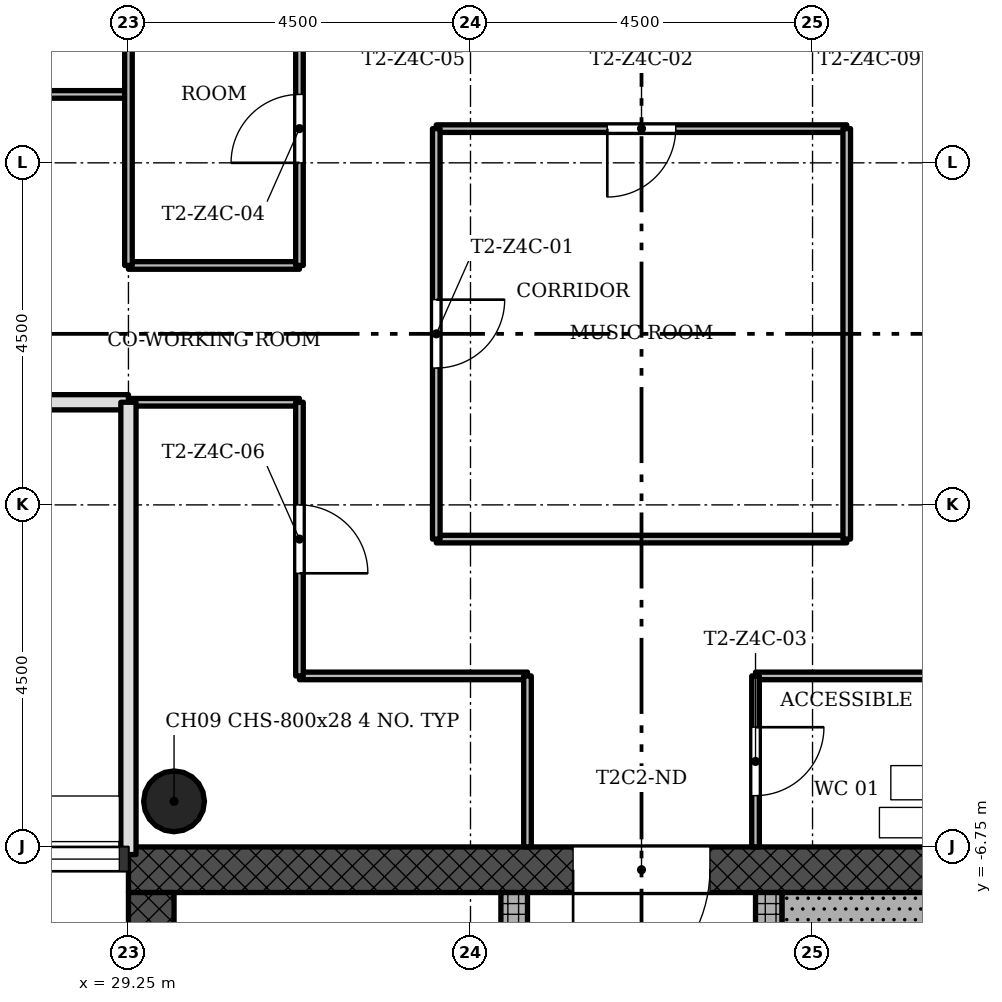
"""IFC4 building model, lengths in metres.
Left out: names, types, materials, properties, quantities, classifications, styles, units other than length and angle.
Written with IfcOpenShell. Run it as: python <this file> out.ifc"""

import sys

from ifc_helpers import new_model, si_unit, direction, frame, frame_2d, origin, origin_2d, place, context, subcontext, project, spatial, rectangle, hollow_circle, extrude, element, fill, save


model = new_model("IFC4")
c1 = context("Model", 3, precision=1e-05, world=origin(), true_north=direction((0.0, 1.0)))
c2 = subcontext(c1, "Body", "Model", "MODEL_VIEW")
j1 = project(units=[si_unit("LENGTHUNIT", "METRE"), si_unit("PLANEANGLEUNIT", "RADIAN")], contexts=[c1])
p1 = place(None, origin())
s1 = spatial("IfcSite", under=j1, at=p1, CompositionType="ELEMENT")
p2 = place(p1, origin())
s2 = spatial("IfcBuilding", under=s1, at=p2, CompositionType="ELEMENT")
p3 = place(p2, frame((0.0, 0.0, 185.8)))
s3 = spatial("IfcBuildingStorey", under=s2, at=p3, CompositionType="ELEMENT", Elevation=185.8)
p4 = place(p3, frame((42.15, -7.05, 0.0), z_axis=(0.0, 0.0, 1.0), x_axis=(-1.0, 0.0, 0.0)))
e1 = element("IfcWall", 1, at=p4, inside=s3, PredefinedType="SHEAR", context=c2, shape_type="SweptSolid", body=[
    extrude(rectangle(XDim=12.9, YDim=0.6, at=frame_2d((6.45, 0.0))), origin(), (0.0, 0.0, 1.0), 3.4),
])
p5 = place(p4, frame((5.25, 0.0, 0.0)))
e2 = element("IfcOpeningElement", 2, at=p5, cuts=e1, PredefinedType="OPENING", context=c2, shape_type="SweptSolid", body=[
    extrude(rectangle(XDim=1.8, YDim=2.1, at=frame_2d((0.9, 1.05))), frame((0.0, 0.31, 0.0), z_axis=(0.0, -1.0, 0.0), x_axis=(1.0, 0.0, 0.0)), (0.0, 0.0, 1.0), 0.62),
])
p6 = place(p3, frame((29.55, -7.35, 0.0), z_axis=(0.0, 0.0, 1.0), x_axis=(0.0, -1.0, 0.0)))
e3 = element("IfcWall", 3, at=p6, inside=s3, PredefinedType="SHEAR", context=c2, shape_type="SweptSolid", body=[
    extrude(rectangle(XDim=8.4, YDim=0.6, at=frame_2d((4.2, 0.0))), origin(), (0.0, 0.0, 1.0), 3.4),
])
p7 = place(p3, frame((34.325, -15.15, 0.0), z_axis=(0.0, 0.0, 1.0), x_axis=(0.0, 1.0, 0.0)))
e4 = element("IfcWall", 4, at=p7, inside=s3, PredefinedType="SHEAR", context=c2, shape_type="SweptSolid", body=[
    extrude(rectangle(XDim=7.8, YDim=0.35, at=frame_2d((3.9, 0.0))), origin(), (0.0, 0.0, 1.0), 3.4),
])
p8 = place(p7, frame((5.55, 0.0, 0.0)))
e5 = element("IfcOpeningElement", 5, at=p8, cuts=e4, PredefinedType="OPENING", context=c2, shape_type="SweptSolid", body=[
    extrude(rectangle(XDim=1.1, YDim=2.1, at=frame_2d((0.55, 1.05))), frame((0.0, 0.185, 0.0), z_axis=(0.0, -1.0, 0.0), x_axis=(1.0, 0.0, 0.0)), (0.0, 0.0, 1.0), 0.37),
])
p9 = place(p7, frame((1.2, 0.0, 0.0)))
e6 = element("IfcOpeningElement", 6, at=p9, cuts=e4, PredefinedType="OPENING", context=c2, shape_type="SweptSolid", body=[
    extrude(rectangle(XDim=1.1, YDim=2.1, at=frame_2d((0.55, 1.05))), frame((0.0, 0.185, 0.0), z_axis=(0.0, -1.0, 0.0), x_axis=(1.0, 0.0, 0.0)), (0.0, 0.0, 1.0), 0.37),
])
p10 = place(p7, frame((3.5, 0.0, 0.0)))
e7 = element("IfcOpeningElement", 7, at=p10, cuts=e4, PredefinedType="OPENING", context=c2, shape_type="SweptSolid", body=[
    extrude(rectangle(XDim=0.9, YDim=2.1, at=frame_2d((0.45, 1.05))), frame((0.0, 0.185, 0.0), z_axis=(0.0, -1.0, 0.0), x_axis=(1.0, 0.0, 0.0)), (0.0, 0.0, 1.0), 0.37),
])
p11 = place(p3, frame((37.675, -15.15, 0.0), z_axis=(0.0, 0.0, 1.0), x_axis=(0.0, 1.0, 0.0)))
e8 = element("IfcWall", 8, at=p11, inside=s3, PredefinedType="SHEAR", context=c2, shape_type="SweptSolid", body=[
    extrude(rectangle(XDim=7.8, YDim=0.35, at=frame_2d((3.9, 0.0))), origin(), (0.0, 0.0, 1.0), 3.4),
])
p12 = place(p11, frame((5.85, 0.0, 0.0)))
e9 = element("IfcOpeningElement", 9, at=p12, cuts=e8, PredefinedType="OPENING", context=c2, shape_type="SweptSolid", body=[
    extrude(rectangle(XDim=0.9, YDim=2.1, at=frame_2d((0.45, 1.05))), frame((0.0, 0.185, 0.0), z_axis=(0.0, -1.0, 0.0), x_axis=(1.0, 0.0, 0.0)), (0.0, 0.0, 1.0), 0.37),
])
p13 = place(p3, frame((29.85, -6.15, 0.0), z_axis=(0.0, 0.0, 1.0), x_axis=(1.0, 0.0, 0.0)))
e10 = element("IfcColumn", 10, at=p13, inside=s3, PredefinedType="COLUMN", context=c2, shape_type="SweptSolid", body=[
    extrude(hollow_circle(Radius=0.4, WallThickness=0.028, at=origin_2d()), origin(), (0.0, 0.0, 1.0), 3.4),
])
for number, where, z_axis, x_axis in (
    (11, (40.5, -4.5, 0.0), (0.0, 0.0, 1.0), (-1.0, 0.0, 0.0)),
    (12, (34.5, -4.5, 0.0), (0.0, 0.0, 1.0), (-1.0, 0.0, 0.0)),
):
    element("IfcWall", number, at=place(p3, frame(where, z_axis=z_axis, x_axis=x_axis)), inside=s3, PredefinedType="PARTITIONING", context=c2, shape_type="SweptSolid", body=[
        extrude(rectangle(XDim=3.0, YDim=0.1, at=frame_2d((1.5, 0.0))), origin(), (0.0, 0.0, 1.0), 3.0),
    ])
p14 = place(p3, frame((38.7, -2.7, 0.0), z_axis=(0.0, 0.0, 1.0), x_axis=(-1.0, 0.0, 0.0)))
e13 = element("IfcWall", 13, at=p14, inside=s3, PredefinedType="PARTITIONING", context=c2, shape_type="SweptSolid", body=[
    extrude(rectangle(XDim=5.4, YDim=0.1, at=frame_2d((2.7, 0.0))), origin(), (0.0, 0.0, 1.0), 3.0),
])
p15 = place(p3, frame((31.5, -0.9, 0.0), z_axis=(0.0, 0.0, 1.0), x_axis=(-1.0, 0.0, 0.0)))
e14 = element("IfcWall", 14, at=p15, inside=s3, PredefinedType="PARTITIONING", context=c2, shape_type="SweptSolid", body=[
    extrude(rectangle(XDim=2.25, YDim=0.1, at=frame_2d((1.125, 0.0))), origin(), (0.0, 0.0, 1.0), 3.0),
])
p16 = place(p3, frame((29.25, -0.9, 0.0), z_axis=(0.0, 0.0, 1.0), x_axis=(-1.0, 0.0, 0.0)))
e15 = element("IfcWall", 15, at=p16, inside=s3, PredefinedType="SOLIDWALL", context=c2, shape_type="SweptSolid", body=[
    extrude(rectangle(XDim=1.8, YDim=0.2, at=frame_2d((0.9, 0.0))), origin(), (0.0, 0.0, 1.0), 3.0),
])
p17 = place(p3, frame((31.5, 0.9, 0.0), z_axis=(0.0, 0.0, 1.0), x_axis=(-1.0, 0.0, 0.0)))
e16 = element("IfcWall", 16, at=p17, inside=s3, PredefinedType="PARTITIONING", context=c2, shape_type="SweptSolid", body=[
    extrude(rectangle(XDim=2.25, YDim=0.1, at=frame_2d((1.125, 0.0))), origin(), (0.0, 0.0, 1.0), 3.0),
])
p18 = place(p3, frame((38.7, 2.7, 0.0), z_axis=(0.0, 0.0, 1.0), x_axis=(-1.0, 0.0, 0.0)))
e17 = element("IfcWall", 17, at=p18, inside=s3, PredefinedType="PARTITIONING", context=c2, shape_type="SweptSolid", body=[
    extrude(rectangle(XDim=5.4, YDim=0.1, at=frame_2d((2.7, 0.0))), origin(), (0.0, 0.0, 1.0), 3.0),
])
p19 = place(p18, frame((2.25, 0.0, 0.0)))
e18 = element("IfcOpeningElement", 18, at=p19, cuts=e17, PredefinedType="OPENING", context=c2, shape_type="SweptSolid", body=[
    extrude(rectangle(XDim=0.9, YDim=2.1, at=frame_2d((0.45, 1.05))), frame((0.0, 0.06, 0.0), z_axis=(0.0, -1.0, 0.0), x_axis=(1.0, 0.0, 0.0)), (0.0, 0.0, 1.0), 0.12),
])
p20 = place(p3, frame((29.25, 3.15, 0.0), z_axis=(0.0, 0.0, 1.0), x_axis=(-1.0, 0.0, 0.0)))
e19 = element("IfcWall", 19, at=p20, inside=s3, PredefinedType="PARTITIONING", context=c2, shape_type="SweptSolid", body=[
    extrude(rectangle(XDim=9.0, YDim=0.1, at=frame_2d((4.5, 0.0))), origin(), (0.0, 0.0, 1.0), 3.0),
])
p21 = place(p20, frame((1.8, 0.0, 0.0)))
e20 = element("IfcOpeningElement", 20, at=p21, cuts=e19, PredefinedType="OPENING", context=c2, shape_type="SweptSolid", body=[
    extrude(rectangle(XDim=0.9, YDim=2.1, at=frame_2d((0.45, 1.05))), frame((0.0, 0.06, 0.0), z_axis=(0.0, -1.0, 0.0), x_axis=(1.0, 0.0, 0.0)), (0.0, 0.0, 1.0), 0.12),
])
p22 = place(p20, frame((6.3, 0.0, 0.0)))
e21 = element("IfcOpeningElement", 21, at=p22, cuts=e19, PredefinedType="OPENING", context=c2, shape_type="SweptSolid", body=[
    extrude(rectangle(XDim=0.9, YDim=2.1, at=frame_2d((0.45, 1.05))), frame((0.0, 0.06, 0.0), z_axis=(0.0, -1.0, 0.0), x_axis=(1.0, 0.0, 0.0)), (0.0, 0.0, 1.0), 0.12),
])
p23 = place(p3, frame((38.7, -2.7, 0.0), z_axis=(0.0, 0.0, 1.0), x_axis=(0.0, 1.0, 0.0)))
e22 = element("IfcWall", 22, at=p23, inside=s3, PredefinedType="PARTITIONING", context=c2, shape_type="SweptSolid", body=[
    extrude(rectangle(XDim=5.4, YDim=0.1, at=frame_2d((2.7, 0.0))), origin(), (0.0, 0.0, 1.0), 3.0),
])
p24 = place(p3, frame((37.5, -6.75, 0.0), z_axis=(0.0, 0.0, 1.0), x_axis=(0.0, 1.0, 0.0)))
e23 = element("IfcWall", 23, at=p24, inside=s3, PredefinedType="PARTITIONING", context=c2, shape_type="SweptSolid", body=[
    extrude(rectangle(XDim=2.25, YDim=0.1, at=frame_2d((1.125, 0.0))), origin(), (0.0, 0.0, 1.0), 3.0),
])
p25 = place(p24, frame((0.675, 0.0, 0.0)))
e24 = element("IfcOpeningElement", 24, at=p25, cuts=e23, PredefinedType="OPENING", context=c2, shape_type="SweptSolid", body=[
    extrude(rectangle(XDim=0.9, YDim=2.1, at=frame_2d((0.45, 1.05))), frame((0.0, 0.06, 0.0), z_axis=(0.0, -1.0, 0.0), x_axis=(1.0, 0.0, 0.0)), (0.0, 0.0, 1.0), 0.12),
])
p26 = place(p3, frame((34.5, -6.75, 0.0), z_axis=(0.0, 0.0, 1.0), x_axis=(0.0, 1.0, 0.0)))
e25 = element("IfcWall", 25, at=p26, inside=s3, PredefinedType="PARTITIONING", context=c2, shape_type="SweptSolid", body=[
    extrude(rectangle(XDim=2.25, YDim=0.1, at=frame_2d((1.125, 0.0))), origin(), (0.0, 0.0, 1.0), 3.0),
])
p27 = place(p3, frame((33.3, -2.7, 0.0), z_axis=(0.0, 0.0, 1.0), x_axis=(0.0, 1.0, 0.0)))
e26 = element("IfcWall", 26, at=p27, inside=s3, PredefinedType="PARTITIONING", context=c2, shape_type="SweptSolid", body=[
    extrude(rectangle(XDim=5.4, YDim=0.1, at=frame_2d((2.7, 0.0))), origin(), (0.0, 0.0, 1.0), 3.0),
])
p28 = place(p27, frame((2.25, 0.0, 0.0)))
e27 = element("IfcOpeningElement", 27, at=p28, cuts=e26, PredefinedType="OPENING", context=c2, shape_type="SweptSolid", body=[
    extrude(rectangle(XDim=0.9, YDim=2.1, at=frame_2d((0.45, 1.05))), frame((0.0, 0.06, 0.0), z_axis=(0.0, -1.0, 0.0), x_axis=(1.0, 0.0, 0.0)), (0.0, 0.0, 1.0), 0.12),
])
p29 = place(p3, frame((31.5, -4.5, 0.0), z_axis=(0.0, 0.0, 1.0), x_axis=(0.0, 1.0, 0.0)))
e28 = element("IfcWall", 28, at=p29, inside=s3, PredefinedType="PARTITIONING", context=c2, shape_type="SweptSolid", body=[
    extrude(rectangle(XDim=3.6, YDim=0.1, at=frame_2d((1.8, 0.0))), origin(), (0.0, 0.0, 1.0), 3.0),
])
p30 = place(p29, frame((1.35, 0.0, 0.0)))
e29 = element("IfcOpeningElement", 29, at=p30, cuts=e28, PredefinedType="OPENING", context=c2, shape_type="SweptSolid", body=[
    extrude(rectangle(XDim=0.9, YDim=2.1, at=frame_2d((0.45, 1.05))), frame((0.0, 0.06, 0.0), z_axis=(0.0, -1.0, 0.0), x_axis=(1.0, 0.0, 0.0)), (0.0, 0.0, 1.0), 0.12),
])
p31 = place(p3, frame((31.5, 0.9, 0.0), z_axis=(0.0, 0.0, 1.0), x_axis=(0.0, 1.0, 0.0)))
e30 = element("IfcWall", 30, at=p31, inside=s3, PredefinedType="PARTITIONING", context=c2, shape_type="SweptSolid", body=[
    extrude(rectangle(XDim=5.85, YDim=0.1, at=frame_2d((2.925, 0.0))), origin(), (0.0, 0.0, 1.0), 3.0),
])
p32 = place(p31, frame((1.35, 0.0, 0.0)))
e31 = element("IfcOpeningElement", 31, at=p32, cuts=e30, PredefinedType="OPENING", context=c2, shape_type="SweptSolid", body=[
    extrude(rectangle(XDim=0.9, YDim=2.1, at=frame_2d((0.45, 1.05))), frame((0.0, 0.06, 0.0), z_axis=(0.0, -1.0, 0.0), x_axis=(1.0, 0.0, 0.0)), (0.0, 0.0, 1.0), 0.12),
])
p33 = place(p3, frame((29.25, 0.9, 0.0), z_axis=(0.0, 0.0, 1.0), x_axis=(0.0, 1.0, 0.0)))
e32 = element("IfcWall", 32, at=p33, inside=s3, PredefinedType="PARTITIONING", context=c2, shape_type="SweptSolid", body=[
    extrude(rectangle(XDim=5.95, YDim=0.1, at=frame_2d((2.975, 0.0))), origin(), (0.0, 0.0, 1.0), 3.0),
])
p34 = place(p3, frame((29.25, -6.85, 0.0), z_axis=(0.0, 0.0, 1.0), x_axis=(0.0, 1.0, 0.0)))
e33 = element("IfcWall", 33, at=p34, inside=s3, PredefinedType="SOLIDWALL", context=c2, shape_type="SweptSolid", body=[
    extrude(rectangle(XDim=5.95, YDim=0.2, at=frame_2d((2.975, 0.0))), origin(), (0.0, 0.0, 1.0), 3.0),
])
p35 = place(p3, frame((37.85, -7.65, 0.0), z_axis=(0.0, 0.0, 1.0), x_axis=(1.0, 0.0, 0.0)))
e34 = element("IfcWall", 34, at=p35, inside=s3, PredefinedType="SHEAR", context=c2, shape_type="SweptSolid", body=[
    extrude(rectangle(XDim=4.3, YDim=0.6, at=frame_2d((2.15, 0.0))), origin(), (0.0, 0.0, 1.0), 3.4),
])
p36 = place(p28, origin())
e35 = element("IfcDoor", 35, at=p36, inside=s3, OperationType="SINGLE_SWING_RIGHT", PredefinedType="DOOR", context=c2, shape_type="SweptSolid", body=[
    extrude(rectangle(XDim=0.9, YDim=2.1, at=frame_2d((0.45, 1.05))), frame((0.0, 0.025, 0.0), z_axis=(0.0, -1.0, 0.0), x_axis=(1.0, 0.0, 0.0)), (0.0, 0.0, 1.0), 0.05),
])
fill(e27, e35)
p37 = place(p19, origin())
e36 = element("IfcDoor", 36, at=p37, inside=s3, OperationType="SINGLE_SWING_LEFT", PredefinedType="DOOR", context=c2, shape_type="SweptSolid", body=[
    extrude(rectangle(XDim=0.9, YDim=2.1, at=frame_2d((0.45, 1.05))), frame((0.0, 0.025, 0.0), z_axis=(0.0, -1.0, 0.0), x_axis=(1.0, 0.0, 0.0)), (0.0, 0.0, 1.0), 0.05),
])
fill(e18, e36)
p38 = place(p25, origin())
e37 = element("IfcDoor", 37, at=p38, inside=s3, OperationType="SINGLE_SWING_RIGHT", PredefinedType="DOOR", context=c2, shape_type="SweptSolid", body=[
    extrude(rectangle(XDim=0.9, YDim=2.1, at=frame_2d((0.45, 1.05))), frame((0.0, 0.025, 0.0), z_axis=(0.0, -1.0, 0.0), x_axis=(1.0, 0.0, 0.0)), (0.0, 0.0, 1.0), 0.05),
])
fill(e24, e37)
p39 = place(p32, origin())
e38 = element("IfcDoor", 38, at=p39, inside=s3, OperationType="SINGLE_SWING_RIGHT", PredefinedType="DOOR", context=c2, shape_type="SweptSolid", body=[
    extrude(rectangle(XDim=0.9, YDim=2.1, at=frame_2d((0.45, 1.05))), frame((0.0, 0.025, 0.0), z_axis=(0.0, -1.0, 0.0), x_axis=(1.0, 0.0, 0.0)), (0.0, 0.0, 1.0), 0.05),
])
fill(e31, e38)
p40 = place(p30, origin())
e39 = element("IfcDoor", 39, at=p40, inside=s3, OperationType="SINGLE_SWING_LEFT", PredefinedType="DOOR", context=c2, shape_type="SweptSolid", body=[
    extrude(rectangle(XDim=0.9, YDim=2.1, at=frame_2d((0.45, 1.05))), frame((0.0, 0.025, 0.0), z_axis=(0.0, -1.0, 0.0), x_axis=(1.0, 0.0, 0.0)), (0.0, 0.0, 1.0), 0.05),
])
fill(e29, e39)
p41 = place(p5, origin())
e40 = element("IfcDoor", 40, at=p41, inside=s3, OperationType="SINGLE_SWING_LEFT", PredefinedType="DOOR", context=c2, shape_type="SweptSolid", body=[
    extrude(rectangle(XDim=1.8, YDim=2.1, at=frame_2d((0.9, 1.05))), frame((0.0, 0.025, 0.0), z_axis=(0.0, -1.0, 0.0), x_axis=(1.0, 0.0, 0.0)), (0.0, 0.0, 1.0), 0.05),
])
fill(e2, e40)
save(model, sys.argv[1])
